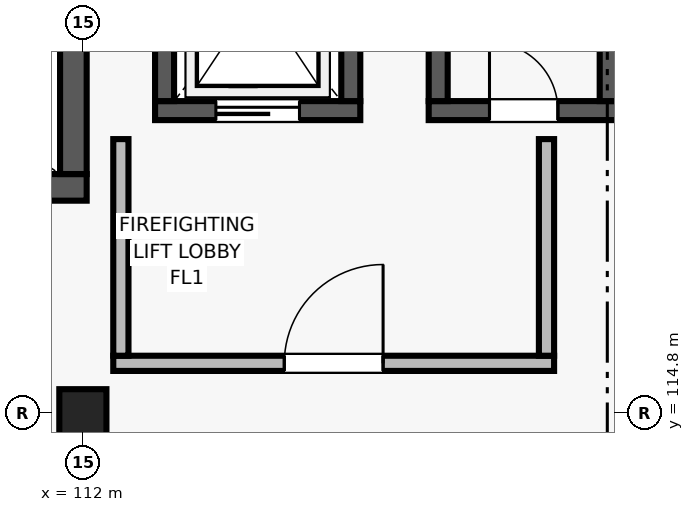
"""IFC4 building model, lengths in metres.
Left out: names, types, materials, properties, quantities, classifications, styles, units other than length and angle.
Written with IfcOpenShell. Run it as: python <this file> out.ifc"""

import sys

from ifc_helpers import new_model, si_unit, direction, frame, frame_2d, origin, origin_2d, place, context, subcontext, project, spatial, rectangle, extrude, element, fill, save


model = new_model("IFC4")
c1 = context("Model", 3, precision=1e-05, world=origin(), true_north=direction((0.0, 1.0)))
c2 = subcontext(c1, "Body", "Model", "MODEL_VIEW")
j1 = project(units=[si_unit("LENGTHUNIT", "METRE"), si_unit("PLANEANGLEUNIT", "RADIAN")], contexts=[c1])
p1 = place(None, origin())
s1 = spatial("IfcSite", under=j1, at=p1, CompositionType="ELEMENT")
p2 = place(p1, origin())
s2 = spatial("IfcBuilding", under=s1, at=p2, CompositionType="ELEMENT")
p3 = place(p2, frame((0.0, 0.0, 9.0)))
s3 = spatial("IfcBuildingStorey", under=s2, at=p3, CompositionType="ELEMENT", Elevation=9.0)
p4 = place(p3, frame((112.0, 114.8, 0.0), z_axis=(0.0, 0.0, 1.0), x_axis=(1.0, 0.0, 0.0)))
e1 = element("IfcColumn", 1, at=p4, inside=s3, PredefinedType="COLUMN", context=c2, shape_type="SweptSolid", body=[
    extrude(rectangle(XDim=0.62, YDim=0.62, at=origin_2d()), origin(), (0.0, 0.0, 1.0), 4.2),
])
p5 = place(p3, frame((103.95, 117.765, 0.0), z_axis=(0.0, 0.0, 1.0), x_axis=(1.0, 0.0, 0.0)))
e2 = element("IfcWall", 2, at=p5, inside=s3, PredefinedType="SHEAR", context=c2, shape_type="SweptSolid", body=[
    extrude(rectangle(XDim=8.1, YDim=0.35, at=frame_2d((4.05, 0.0))), origin(), (0.0, 0.0, 1.0), 3.92),
])
p6 = place(p5, frame((0.6, 0.0, 0.0)))
e3 = element("IfcOpeningElement", 3, at=p6, cuts=e2, PredefinedType="OPENING", context=c2, shape_type="SweptSolid", body=[
    extrude(rectangle(XDim=1.25, YDim=2.2, at=frame_2d((0.625, 1.1))), frame((0.0, 0.185, 0.0), z_axis=(0.0, -1.0, 0.0), x_axis=(1.0, 0.0, 0.0)), (0.0, 0.0, 1.0), 0.37),
])
p7 = place(p3, frame((111.875, 117.94, 0.0), z_axis=(0.0, 0.0, 1.0), x_axis=(0.0, 1.0, 0.0)))
e4 = element("IfcWall", 4, at=p7, inside=s3, PredefinedType="SHEAR", context=c2, shape_type="SweptSolid", body=[
    extrude(rectangle(XDim=3.76, YDim=0.35, at=frame_2d((1.88, 0.0))), origin(), (0.0, 0.0, 1.0), 3.92),
])
p8 = place(p3, frame((112.95, 118.775, 0.0), z_axis=(0.0, 0.0, 1.0), x_axis=(1.0, 0.0, 0.0)))
e5 = element("IfcWall", 5, at=p8, inside=s3, PredefinedType="SHEAR", context=c2, shape_type="SweptSolid", body=[
    extrude(rectangle(XDim=2.7, YDim=0.25, at=frame_2d((1.35, 0.0))), origin(), (0.0, 0.0, 1.0), 3.92),
])
p9 = place(p8, frame((0.8, 0.0, 0.0)))
e6 = element("IfcOpeningElement", 6, at=p9, cuts=e5, PredefinedType="OPENING", context=c2, shape_type="SweptSolid", body=[
    extrude(rectangle(XDim=1.1, YDim=2.15, at=frame_2d((0.55, 1.075))), frame((0.0, 0.135, 0.0), z_axis=(0.0, -1.0, 0.0), x_axis=(1.0, 0.0, 0.0)), (0.0, 0.0, 1.0), 0.27),
])
for number, where, z_axis, x_axis in (
    (7, (113.075, 118.9, 0.0), (0.0, 0.0, 1.0), (0.0, 1.0, 0.0)),
    (8, (115.525, 118.9, 0.0), (0.0, 0.0, 1.0), (0.0, 1.0, 0.0)),
):
    element("IfcWall", number, at=place(p3, frame(where, z_axis=z_axis, x_axis=x_axis)), inside=s3, PredefinedType="SHEAR", context=c2, shape_type="SweptSolid", body=[
        extrude(rectangle(XDim=2.8, YDim=0.25, at=frame_2d((1.4, 0.0))), origin(), (0.0, 0.0, 1.0), 3.92),
    ])
p10 = place(p3, frame((112.4, 115.45, 0.0), z_axis=(0.0, 0.0, 1.0), x_axis=(1.0, 0.0, 0.0)))
e9 = element("IfcWall", 9, at=p10, inside=s3, PredefinedType="SOLIDWALL", context=c2, shape_type="SweptSolid", body=[
    extrude(rectangle(XDim=5.8, YDim=0.2, at=frame_2d((2.9, 0.0))), origin(), (0.0, 0.0, 1.0), 3.92),
])
p11 = place(p10, frame((2.25, 0.0, 0.0)))
e10 = element("IfcOpeningElement", 10, at=p11, cuts=e9, PredefinedType="OPENING", context=c2, shape_type="SweptSolid", body=[
    extrude(rectangle(XDim=1.3, YDim=2.2, at=frame_2d((0.65, 1.1))), frame((0.0, 0.11, 0.0), z_axis=(0.0, -1.0, 0.0), x_axis=(1.0, 0.0, 0.0)), (0.0, 0.0, 1.0), 0.22),
])
for number, where, z_axis, x_axis in (
    (11, (112.5, 115.55, 0.0), (0.0, 0.0, 1.0), (0.0, 1.0, 0.0)),
    (12, (118.1, 115.55, 0.0), (0.0, 0.0, 1.0), (0.0, 1.0, 0.0)),
):
    element("IfcWall", number, at=place(p3, frame(where, z_axis=z_axis, x_axis=x_axis)), inside=s3, PredefinedType="SOLIDWALL", context=c2, shape_type="SweptSolid", body=[
        extrude(rectangle(XDim=2.85, YDim=0.2, at=frame_2d((1.425, 0.0))), origin(), (0.0, 0.0, 1.0), 3.92),
    ])
p12 = place(p3, frame((116.55, 118.775, 0.0), z_axis=(0.0, 0.0, 1.0), x_axis=(1.0, 0.0, 0.0)))
e13 = element("IfcWall", 13, at=p12, inside=s3, PredefinedType="SHEAR", context=c2, shape_type="SweptSolid", body=[
    extrude(rectangle(XDim=2.5, YDim=0.25, at=frame_2d((1.25, 0.0))), origin(), (0.0, 0.0, 1.0), 3.92),
])
p13 = place(p12, frame((0.8, 0.0, 0.0)))
e14 = element("IfcOpeningElement", 14, at=p13, cuts=e13, PredefinedType="OPENING", context=c2, shape_type="SweptSolid", body=[
    extrude(rectangle(XDim=0.9, YDim=2.05, at=frame_2d((0.45, 1.025))), frame((0.0, 0.135, 0.0), z_axis=(0.0, -1.0, 0.0), x_axis=(1.0, 0.0, 0.0)), (0.0, 0.0, 1.0), 0.27),
])
for number, where, z_axis, x_axis in (
    (15, (116.675, 118.9, 0.0), (0.0, 0.0, 1.0), (0.0, 1.0, 0.0)),
    (16, (118.925, 118.9, 0.0), (0.0, 0.0, 1.0), (0.0, 1.0, 0.0)),
):
    element("IfcWall", number, at=place(p3, frame(where, z_axis=z_axis, x_axis=x_axis)), inside=s3, PredefinedType="SHEAR", context=c2, shape_type="SweptSolid", body=[
        extrude(rectangle(XDim=2.8, YDim=0.25, at=frame_2d((1.4, 0.0))), origin(), (0.0, 0.0, 1.0), 3.92),
    ])
p14 = place(p11, origin())
e17 = element("IfcDoor", 17, at=p14, inside=s3, OperationType="SINGLE_SWING_RIGHT", PredefinedType="DOOR", context=c2, shape_type="SweptSolid", body=[
    extrude(rectangle(XDim=1.3, YDim=2.2, at=frame_2d((0.65, 1.1))), frame((0.0, 0.025, 0.0), z_axis=(0.0, -1.0, 0.0), x_axis=(1.0, 0.0, 0.0)), (0.0, 0.0, 1.0), 0.05),
])
fill(e10, e17)
p15 = place(p13, origin())
e18 = element("IfcDoor", 18, at=p15, inside=s3, OperationType="SINGLE_SWING_LEFT", PredefinedType="DOOR", context=c2, shape_type="SweptSolid", body=[
    extrude(rectangle(XDim=0.9, YDim=2.05, at=frame_2d((0.45, 1.025))), frame((0.0, 0.025, 0.0), z_axis=(0.0, -1.0, 0.0), x_axis=(1.0, 0.0, 0.0)), (0.0, 0.0, 1.0), 0.05),
])
fill(e14, e18)
p16 = place(p9, origin())
e19 = element("IfcDoor", 19, at=p16, inside=s3, OperationType="SLIDING_TO_LEFT", PredefinedType="DOOR", context=c2, shape_type="SweptSolid", body=[
    extrude(rectangle(XDim=1.1, YDim=2.15, at=frame_2d((0.55, 1.075))), frame((0.0, 0.025, 0.0), z_axis=(0.0, -1.0, 0.0), x_axis=(1.0, 0.0, 0.0)), (0.0, 0.0, 1.0), 0.05),
])
fill(e6, e19)
save(model, sys.argv[1])
